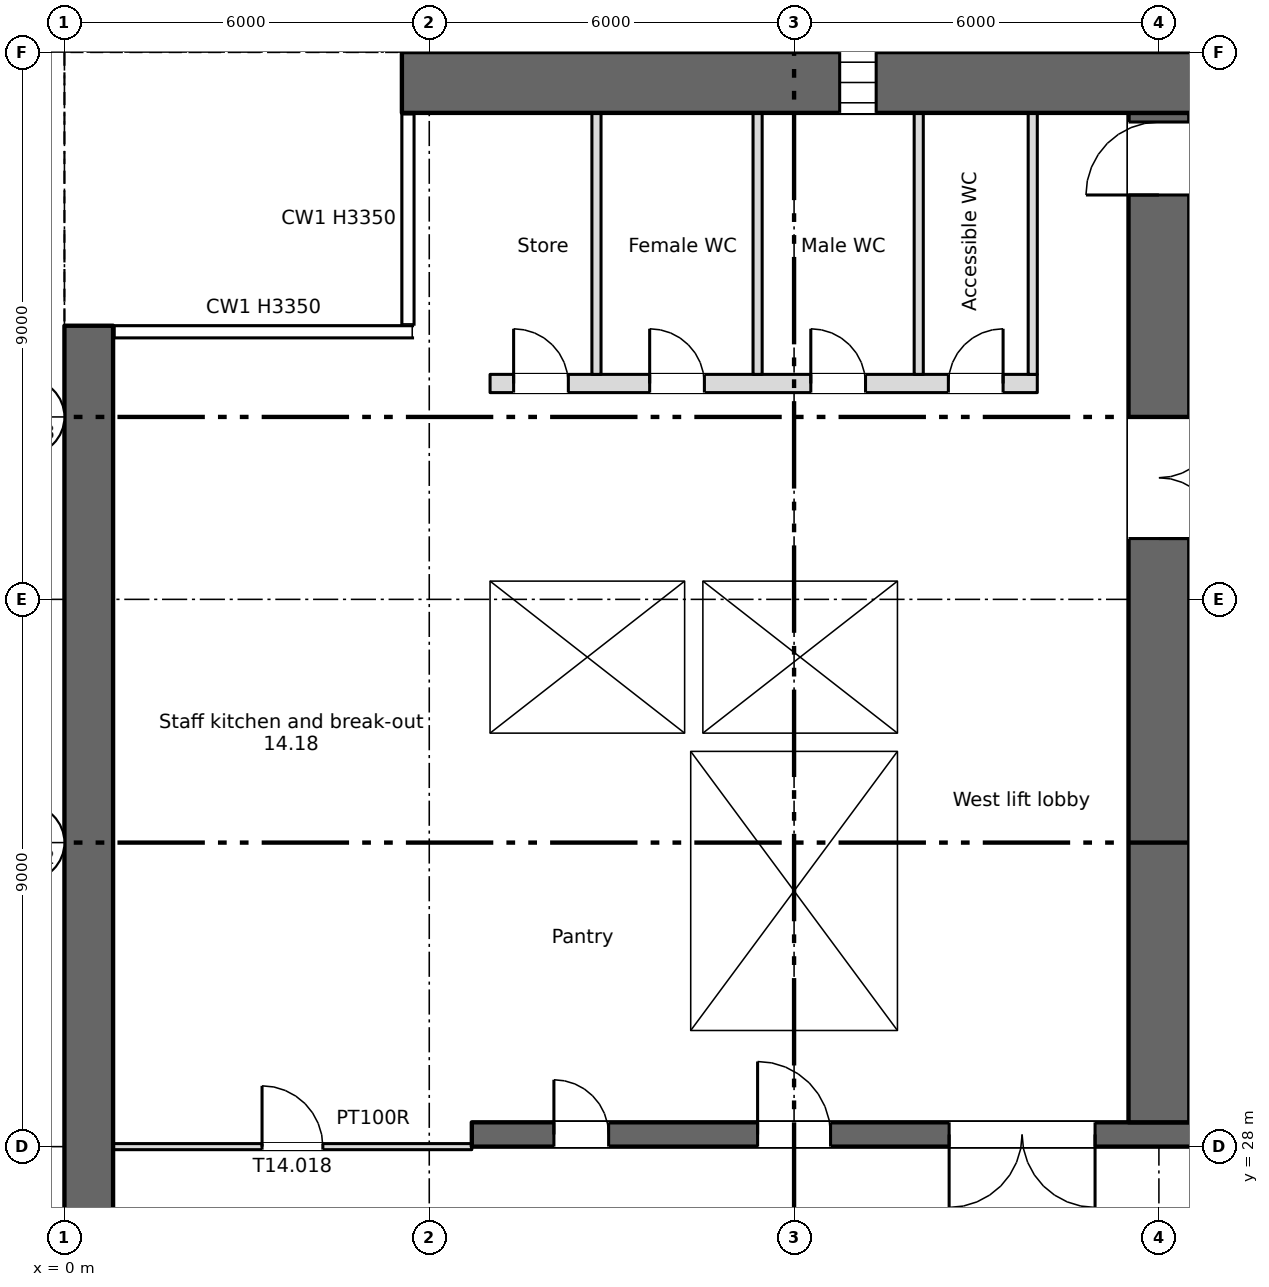
"""IFC4 building model, lengths in metres.
Left out: names, types, materials, properties, quantities, classifications, styles, units other than length and angle.
Written with IfcOpenShell. Run it as: python <this file> out.ifc"""

import sys

from ifc_helpers import new_model, si_unit, direction, frame, frame_2d, origin, place, context, subcontext, project, spatial, rectangle, extrude, element, fill, save


model = new_model("IFC4")
c1 = context("Model", 3, precision=1e-05, world=origin(), true_north=direction((0.0, 1.0)))
c2 = subcontext(c1, "Body", "Model", "MODEL_VIEW")
j1 = project(units=[si_unit("LENGTHUNIT", "METRE"), si_unit("PLANEANGLEUNIT", "RADIAN")], contexts=[c1])
p1 = place(None, origin())
s1 = spatial("IfcSite", under=j1, at=p1, CompositionType="ELEMENT")
p2 = place(p1, origin())
s2 = spatial("IfcBuilding", under=s1, at=p2, CompositionType="ELEMENT")
p3 = place(p2, frame((0.0, 0.0, 78.75)))
s3 = spatial("IfcBuildingStorey", under=s2, at=p3, CompositionType="ELEMENT", Elevation=78.75)
p4 = place(p3, frame((0.4, 4.5, 0.0), z_axis=(0.0, 0.0, 1.0), x_axis=(0.0, 1.0, 0.0)))
e1 = element("IfcWall", 1, at=p4, inside=s3, PredefinedType="SHEAR", context=c2, shape_type="SweptSolid", body=[
    extrude(rectangle(XDim=37.0, YDim=0.8, at=frame_2d((18.5, 0.0))), origin(), (0.0, 0.0, 1.0), 3.35),
])
p5 = place(p4, frame((1.2, 0.0, 0.6)))
e2 = element("IfcOpeningElement", 2, at=p5, cuts=e1, PredefinedType="OPENING", context=c2, shape_type="SweptSolid", body=[
    extrude(rectangle(XDim=0.6, YDim=2.4, at=frame_2d((0.3, 1.2))), frame((0.0, 0.41, 0.0), z_axis=(0.0, -1.0, 0.0), x_axis=(1.0, 0.0, 0.0)), (0.0, 0.0, 1.0), 0.82),
])
p6 = place(p4, frame((7.2, 0.0, 0.6)))
e3 = element("IfcOpeningElement", 3, at=p6, cuts=e1, PredefinedType="OPENING", context=c2, shape_type="SweptSolid", body=[
    extrude(rectangle(XDim=0.6, YDim=2.4, at=frame_2d((0.3, 1.2))), frame((0.0, 0.41, 0.0), z_axis=(0.0, -1.0, 0.0), x_axis=(1.0, 0.0, 0.0)), (0.0, 0.0, 1.0), 0.82),
])
p7 = place(p4, frame((13.2, 0.0, 0.6)))
e4 = element("IfcOpeningElement", 4, at=p7, cuts=e1, PredefinedType="OPENING", context=c2, shape_type="SweptSolid", body=[
    extrude(rectangle(XDim=0.6, YDim=2.4, at=frame_2d((0.3, 1.2))), frame((0.0, 0.41, 0.0), z_axis=(0.0, -1.0, 0.0), x_axis=(1.0, 0.0, 0.0)), (0.0, 0.0, 1.0), 0.82),
])
p8 = place(p4, frame((19.2, 0.0, 0.6)))
e5 = element("IfcOpeningElement", 5, at=p8, cuts=e1, PredefinedType="OPENING", context=c2, shape_type="SweptSolid", body=[
    extrude(rectangle(XDim=0.6, YDim=2.4, at=frame_2d((0.3, 1.2))), frame((0.0, 0.41, 0.0), z_axis=(0.0, -1.0, 0.0), x_axis=(1.0, 0.0, 0.0)), (0.0, 0.0, 1.0), 0.82),
])
p9 = place(p3, frame((5.55, 45.5, 0.0), z_axis=(0.0, 0.0, 1.0), x_axis=(1.0, 0.0, 0.0)))
e6 = element("IfcWall", 6, at=p9, inside=s3, PredefinedType="SHEAR", context=c2, shape_type="SweptSolid", body=[
    extrude(rectangle(XDim=66.9, YDim=1.0, at=frame_2d((33.45, 0.0))), origin(), (0.0, 0.0, 1.0), 3.35),
])
p10 = place(p9, frame((7.2, 0.0, 0.6)))
e7 = element("IfcOpeningElement", 7, at=p10, cuts=e6, PredefinedType="OPENING", context=c2, shape_type="SweptSolid", body=[
    extrude(rectangle(XDim=0.6, YDim=2.4, at=frame_2d((0.3, 1.2))), frame((0.0, 0.51, 0.0), z_axis=(0.0, -1.0, 0.0), x_axis=(1.0, 0.0, 0.0)), (0.0, 0.0, 1.0), 1.02),
])
p11 = place(p9, frame((61.2, 0.0, 0.6)))
e8 = element("IfcOpeningElement", 8, at=p11, cuts=e6, PredefinedType="OPENING", context=c2, shape_type="SweptSolid", body=[
    extrude(rectangle(XDim=0.6, YDim=2.4, at=frame_2d((0.3, 1.2))), frame((0.0, 0.51, 0.0), z_axis=(0.0, -1.0, 0.0), x_axis=(1.0, 0.0, 0.0)), (0.0, 0.0, 1.0), 1.02),
])
p12 = place(p3, frame((6.7, 28.2, 0.0), z_axis=(0.0, 0.0, 1.0), x_axis=(1.0, 0.0, 0.0)))
e9 = element("IfcWall", 9, at=p12, inside=s3, PredefinedType="SHEAR", context=c2, shape_type="SweptSolid", body=[
    extrude(rectangle(XDim=57.8, YDim=0.4, at=frame_2d((28.9, 0.0))), origin(), (0.0, 0.0, 1.0), 3.35),
])
p13 = place(p12, frame((12.062, 0.0, 0.0)))
e10 = element("IfcOpeningElement", 10, at=p13, cuts=e9, PredefinedType="OPENING", context=c2, shape_type="SweptSolid", body=[
    extrude(rectangle(XDim=0.9, YDim=2.1, at=frame_2d((0.45, 1.05))), frame((0.0, 0.21, 0.0), z_axis=(0.0, -1.0, 0.0), x_axis=(1.0, 0.0, 0.0)), (0.0, 0.0, 1.0), 0.42),
])
p14 = place(p12, frame((14.637, 0.0, 0.0)))
e11 = element("IfcOpeningElement", 11, at=p14, cuts=e9, PredefinedType="OPENING", context=c2, shape_type="SweptSolid", body=[
    extrude(rectangle(XDim=0.9, YDim=2.1, at=frame_2d((0.45, 1.05))), frame((0.0, 0.21, 0.0), z_axis=(0.0, -1.0, 0.0), x_axis=(1.0, 0.0, 0.0)), (0.0, 0.0, 1.0), 0.42),
])
p15 = place(p12, frame((49.062, 0.0, 0.0)))
e12 = element("IfcOpeningElement", 12, at=p15, cuts=e9, PredefinedType="OPENING", context=c2, shape_type="SweptSolid", body=[
    extrude(rectangle(XDim=0.9, YDim=2.1, at=frame_2d((0.45, 1.05))), frame((0.0, 0.21, 0.0), z_axis=(0.0, -1.0, 0.0), x_axis=(1.0, 0.0, 0.0)), (0.0, 0.0, 1.0), 0.42),
])
p16 = place(p12, frame((51.637, 0.0, 0.0)))
e13 = element("IfcOpeningElement", 13, at=p16, cuts=e9, PredefinedType="OPENING", context=c2, shape_type="SweptSolid", body=[
    extrude(rectangle(XDim=0.9, YDim=2.1, at=frame_2d((0.45, 1.05))), frame((0.0, 0.21, 0.0), z_axis=(0.0, -1.0, 0.0), x_axis=(1.0, 0.0, 0.0)), (0.0, 0.0, 1.0), 0.42),
])
p17 = place(p12, frame((1.35, 0.0, 0.0)))
e14 = element("IfcOpeningElement", 14, at=p17, cuts=e9, PredefinedType="OPENING", context=c2, shape_type="SweptSolid", body=[
    extrude(rectangle(XDim=0.9, YDim=2.1, at=frame_2d((0.45, 1.05))), frame((0.0, 0.21, 0.0), z_axis=(0.0, -1.0, 0.0), x_axis=(1.0, 0.0, 0.0)), (0.0, 0.0, 1.0), 0.42),
])
p18 = place(p12, frame((4.7, 0.0, 0.0)))
e15 = element("IfcOpeningElement", 15, at=p18, cuts=e9, PredefinedType="OPENING", context=c2, shape_type="SweptSolid", body=[
    extrude(rectangle(XDim=1.2, YDim=2.1, at=frame_2d((0.6, 1.05))), frame((0.0, 0.21, 0.0), z_axis=(0.0, -1.0, 0.0), x_axis=(1.0, 0.0, 0.0)), (0.0, 0.0, 1.0), 0.42),
])
p19 = place(p12, frame((31.7, 0.0, 0.0)))
e16 = element("IfcOpeningElement", 16, at=p19, cuts=e9, PredefinedType="OPENING", context=c2, shape_type="SweptSolid", body=[
    extrude(rectangle(XDim=1.2, YDim=2.1, at=frame_2d((0.6, 1.05))), frame((0.0, 0.21, 0.0), z_axis=(0.0, -1.0, 0.0), x_axis=(1.0, 0.0, 0.0)), (0.0, 0.0, 1.0), 0.42),
])
p20 = place(p12, frame((55.2, 0.0, 0.0)))
e17 = element("IfcOpeningElement", 17, at=p20, cuts=e9, PredefinedType="OPENING", context=c2, shape_type="SweptSolid", body=[
    extrude(rectangle(XDim=1.2, YDim=2.1, at=frame_2d((0.6, 1.05))), frame((0.0, 0.21, 0.0), z_axis=(0.0, -1.0, 0.0), x_axis=(1.0, 0.0, 0.0)), (0.0, 0.0, 1.0), 0.42),
])
p21 = place(p12, frame((21.7, 0.0, 0.0)))
e18 = element("IfcOpeningElement", 18, at=p21, cuts=e9, PredefinedType="OPENING", context=c2, shape_type="SweptSolid", body=[
    extrude(rectangle(XDim=1.2, YDim=2.1, at=frame_2d((0.6, 1.05))), frame((0.0, 0.21, 0.0), z_axis=(0.0, -1.0, 0.0), x_axis=(1.0, 0.0, 0.0)), (0.0, 0.0, 1.0), 0.42),
])
p22 = place(p12, frame((41.7, 0.0, 0.0)))
e19 = element("IfcOpeningElement", 19, at=p22, cuts=e9, PredefinedType="OPENING", context=c2, shape_type="SweptSolid", body=[
    extrude(rectangle(XDim=1.2, YDim=2.1, at=frame_2d((0.6, 1.05))), frame((0.0, 0.21, 0.0), z_axis=(0.0, -1.0, 0.0), x_axis=(1.0, 0.0, 0.0)), (0.0, 0.0, 1.0), 0.42),
])
p23 = place(p12, frame((24.85, 0.0, 0.0)))
e20 = element("IfcOpeningElement", 20, at=p23, cuts=e9, PredefinedType="OPENING", context=c2, shape_type="SweptSolid", body=[
    extrude(rectangle(XDim=2.4, YDim=2.1, at=frame_2d((1.2, 1.05))), frame((0.0, 0.21, 0.0), z_axis=(0.0, -1.0, 0.0), x_axis=(1.0, 0.0, 0.0)), (0.0, 0.0, 1.0), 0.42),
])
p24 = place(p12, frame((37.35, 0.0, 0.0)))
e21 = element("IfcOpeningElement", 21, at=p24, cuts=e9, PredefinedType="OPENING", context=c2, shape_type="SweptSolid", body=[
    extrude(rectangle(XDim=2.4, YDim=2.1, at=frame_2d((1.2, 1.05))), frame((0.0, 0.21, 0.0), z_axis=(0.0, -1.0, 0.0), x_axis=(1.0, 0.0, 0.0)), (0.0, 0.0, 1.0), 0.42),
])
p25 = place(p12, frame((7.85, 0.0, 0.0)))
e22 = element("IfcOpeningElement", 22, at=p25, cuts=e9, PredefinedType="OPENING", context=c2, shape_type="SweptSolid", body=[
    extrude(rectangle(XDim=2.4, YDim=2.1, at=frame_2d((1.2, 1.05))), frame((0.0, 0.21, 0.0), z_axis=(0.0, -1.0, 0.0), x_axis=(1.0, 0.0, 0.0)), (0.0, 0.0, 1.0), 0.42),
])
p26 = place(p12, frame((28.85, 0.0, 0.0)))
e23 = element("IfcOpeningElement", 23, at=p26, cuts=e9, PredefinedType="OPENING", context=c2, shape_type="SweptSolid", body=[
    extrude(rectangle(XDim=0.9, YDim=2.1, at=frame_2d((0.45, 1.05))), frame((0.0, 0.21, 0.0), z_axis=(0.0, -1.0, 0.0), x_axis=(1.0, 0.0, 0.0)), (0.0, 0.0, 1.0), 0.42),
])
p27 = place(p12, frame((34.85, 0.0, 0.0)))
e24 = element("IfcOpeningElement", 24, at=p27, cuts=e9, PredefinedType="OPENING", context=c2, shape_type="SweptSolid", body=[
    extrude(rectangle(XDim=0.9, YDim=2.1, at=frame_2d((0.45, 1.05))), frame((0.0, 0.21, 0.0), z_axis=(0.0, -1.0, 0.0), x_axis=(1.0, 0.0, 0.0)), (0.0, 0.0, 1.0), 0.42),
])
p28 = place(p3, frame((6.85, 28.4, 0.0), z_axis=(0.0, 0.0, 1.0), x_axis=(0.0, 1.0, 0.0)))
e25 = element("IfcWall", 25, at=p28, inside=s3, PredefinedType="SHEAR", context=c2, shape_type="SweptSolid", body=[
    extrude(rectangle(XDim=16.6, YDim=0.3, at=frame_2d((8.3, 0.0))), origin(), (0.0, 0.0, 1.0), 3.35),
])
p29 = place(p3, frame((18.0, 28.4, 0.0), z_axis=(0.0, 0.0, 1.0), x_axis=(0.0, 1.0, 0.0)))
e26 = element("IfcWall", 26, at=p29, inside=s3, PredefinedType="SHEAR", context=c2, shape_type="SweptSolid", body=[
    extrude(rectangle(XDim=16.6, YDim=1.0, at=frame_2d((8.3, 0.0))), origin(), (0.0, 0.0, 1.0), 3.35),
])
p30 = place(p29, frame((9.6, 0.0, 0.0)))
e27 = element("IfcOpeningElement", 27, at=p30, cuts=e26, PredefinedType="OPENING", context=c2, shape_type="SweptSolid", body=[
    extrude(rectangle(XDim=2.0, YDim=2.1, at=frame_2d((1.0, 1.05))), frame((0.0, 0.51, 0.0), z_axis=(0.0, -1.0, 0.0), x_axis=(1.0, 0.0, 0.0)), (0.0, 0.0, 1.0), 1.02),
])
p31 = place(p29, frame((15.25, 0.0, 0.0)))
e28 = element("IfcOpeningElement", 28, at=p31, cuts=e26, PredefinedType="OPENING", context=c2, shape_type="SweptSolid", body=[
    extrude(rectangle(XDim=1.2, YDim=2.1, at=frame_2d((0.6, 1.05))), frame((0.0, 0.51, 0.0), z_axis=(0.0, -1.0, 0.0), x_axis=(1.0, 0.0, 0.0)), (0.0, 0.0, 1.0), 1.02),
])
for number, where, z_axis, x_axis in (
    (29, (10.15, 28.4, 0.0), (0.0, 0.0, 1.0), (0.0, 1.0, 0.0)),
    (30, (13.85, 28.4, 0.0), (0.0, 0.0, 1.0), (0.0, 1.0, 0.0)),
):
    element("IfcWall", number, at=place(p3, frame(where, z_axis=z_axis, x_axis=x_axis)), inside=s3, PredefinedType="SHEAR", context=c2, shape_type="SweptSolid", body=[
        extrude(rectangle(XDim=6.1, YDim=0.3, at=frame_2d((3.05, 0.0))), origin(), (0.0, 0.0, 1.0), 3.35),
    ])
for number, where, z_axis, x_axis in (
    (31, (7.0, 34.65, 0.0), (0.0, 0.0, 1.0), (1.0, 0.0, 0.0)),
    (32, (7.0, 37.45, 0.0), (0.0, 0.0, 1.0), (1.0, 0.0, 0.0)),
):
    element("IfcWall", number, at=place(p3, frame(where, z_axis=z_axis, x_axis=x_axis)), inside=s3, PredefinedType="SHEAR", context=c2, shape_type="SweptSolid", body=[
        extrude(rectangle(XDim=7.0, YDim=0.3, at=frame_2d((3.5, 0.0))), origin(), (0.0, 0.0, 1.0), 3.35),
    ])
p32 = place(p3, frame((13.85, 34.8, 0.0), z_axis=(0.0, 0.0, 1.0), x_axis=(0.0, 1.0, 0.0)))
e33 = element("IfcWall", 33, at=p32, inside=s3, PredefinedType="SHEAR", context=c2, shape_type="SweptSolid", body=[
    extrude(rectangle(XDim=2.5, YDim=0.3, at=frame_2d((1.25, 0.0))), origin(), (0.0, 0.0, 1.0), 3.35),
])
p33 = place(p3, frame((7.0, 40.55, 0.0), z_axis=(0.0, 0.0, 1.0), x_axis=(1.0, 0.0, 0.0)))
e34 = element("IfcWall", 34, at=p33, inside=s3, PredefinedType="PARTITIONING", context=c2, shape_type="SweptSolid", body=[
    extrude(rectangle(XDim=9.0, YDim=0.3, at=frame_2d((4.5, 0.0))), origin(), (0.0, 0.0, 1.0), 3.35),
])
p34 = place(p33, frame((0.387, 0.0, 0.0)))
e35 = element("IfcOpeningElement", 35, at=p34, cuts=e34, PredefinedType="OPENING", context=c2, shape_type="SweptSolid", body=[
    extrude(rectangle(XDim=0.9, YDim=2.1, at=frame_2d((0.45, 1.05))), frame((0.0, 0.16, 0.0), z_axis=(0.0, -1.0, 0.0), x_axis=(1.0, 0.0, 0.0)), (0.0, 0.0, 1.0), 0.32),
])
p35 = place(p33, frame((2.625, 0.0, 0.0)))
e36 = element("IfcOpeningElement", 36, at=p35, cuts=e34, PredefinedType="OPENING", context=c2, shape_type="SweptSolid", body=[
    extrude(rectangle(XDim=0.9, YDim=2.1, at=frame_2d((0.45, 1.05))), frame((0.0, 0.16, 0.0), z_axis=(0.0, -1.0, 0.0), x_axis=(1.0, 0.0, 0.0)), (0.0, 0.0, 1.0), 0.32),
])
p36 = place(p33, frame((5.275, 0.0, 0.0)))
e37 = element("IfcOpeningElement", 37, at=p36, cuts=e34, PredefinedType="OPENING", context=c2, shape_type="SweptSolid", body=[
    extrude(rectangle(XDim=0.9, YDim=2.1, at=frame_2d((0.45, 1.05))), frame((0.0, 0.16, 0.0), z_axis=(0.0, -1.0, 0.0), x_axis=(1.0, 0.0, 0.0)), (0.0, 0.0, 1.0), 0.32),
])
p37 = place(p33, frame((7.538, 0.0, 0.0)))
e38 = element("IfcOpeningElement", 38, at=p37, cuts=e34, PredefinedType="OPENING", context=c2, shape_type="SweptSolid", body=[
    extrude(rectangle(XDim=0.9, YDim=2.1, at=frame_2d((0.45, 1.05))), frame((0.0, 0.16, 0.0), z_axis=(0.0, -1.0, 0.0), x_axis=(1.0, 0.0, 0.0)), (0.0, 0.0, 1.0), 0.32),
])
p38 = place(p3, frame((10.35, 34.8, 0.0), z_axis=(0.0, 0.0, 1.0), x_axis=(0.0, 1.0, 0.0)))
e39 = element("IfcWall", 39, at=p38, inside=s3, PredefinedType="SHEAR", context=c2, shape_type="SweptSolid", body=[
    extrude(rectangle(XDim=2.5, YDim=0.3, at=frame_2d((1.25, 0.0))), origin(), (0.0, 0.0, 1.0), 3.35),
])
for number, where, z_axis, x_axis in (
    (40, (15.925, 40.7, 0.0), (0.0, 0.0, 1.0), (0.0, 1.0, 0.0)),
    (41, (8.75, 40.7, 0.0), (0.0, 0.0, 1.0), (0.0, 1.0, 0.0)),
    (42, (11.4, 40.7, 0.0), (0.0, 0.0, 1.0), (0.0, 1.0, 0.0)),
    (43, (14.05, 40.7, 0.0), (0.0, 0.0, 1.0), (0.0, 1.0, 0.0)),
):
    element("IfcWall", number, at=place(p3, frame(where, z_axis=z_axis, x_axis=x_axis)), inside=s3, PredefinedType="PARTITIONING", context=c2, shape_type="SweptSolid", body=[
        extrude(rectangle(XDim=4.3, YDim=0.15, at=frame_2d((2.15, 0.0))), origin(), (0.0, 0.0, 1.0), 3.35),
    ])
p39 = place(p3, frame((0.8, 28.0, 0.0), z_axis=(0.0, 0.0, 1.0), x_axis=(1.0, 0.0, 0.0)))
e44 = element("IfcWall", 44, at=p39, inside=s3, PredefinedType="PARTITIONING", context=c2, shape_type="SweptSolid", body=[
    extrude(rectangle(XDim=5.9, YDim=0.1, at=frame_2d((2.95, 0.0))), origin(), (0.0, 0.0, 1.0), 3.35),
])
p40 = place(p39, frame((2.45, 0.0, 0.0)))
e45 = element("IfcOpeningElement", 45, at=p40, cuts=e44, PredefinedType="OPENING", context=c2, shape_type="SweptSolid", body=[
    extrude(rectangle(XDim=1.0, YDim=2.1, at=frame_2d((0.5, 1.05))), frame((0.0, 0.06, 0.0), z_axis=(0.0, -1.0, 0.0), x_axis=(1.0, 0.0, 0.0)), (0.0, 0.0, 1.0), 0.12),
])
p41 = place(p10, origin())
e46 = element("IfcWindow", 46, at=p41, inside=s3, PartitioningType="SINGLE_PANEL", PredefinedType="WINDOW", context=c2, shape_type="SweptSolid", body=[
    extrude(rectangle(XDim=0.6, YDim=2.4, at=frame_2d((0.3, 1.2))), frame((0.0, 0.03, 0.0), z_axis=(0.0, -1.0, 0.0), x_axis=(1.0, 0.0, 0.0)), (0.0, 0.0, 1.0), 0.06),
])
fill(e7, e46)
p42 = place(p17, origin())
e47 = element("IfcDoor", 47, at=p42, inside=s3, OperationType="SINGLE_SWING_LEFT", PredefinedType="DOOR", context=c2, shape_type="SweptSolid", body=[
    extrude(rectangle(XDim=0.9, YDim=2.1, at=frame_2d((0.45, 1.05))), frame((0.0, 0.025, 0.0), z_axis=(0.0, -1.0, 0.0), x_axis=(1.0, 0.0, 0.0)), (0.0, 0.0, 1.0), 0.05),
])
fill(e14, e47)
p43 = place(p34, origin())
e48 = element("IfcDoor", 48, at=p43, inside=s3, OperationType="SINGLE_SWING_LEFT", PredefinedType="DOOR", context=c2, shape_type="SweptSolid", body=[
    extrude(rectangle(XDim=0.9, YDim=2.1, at=frame_2d((0.45, 1.05))), frame((0.0, 0.025, 0.0), z_axis=(0.0, -1.0, 0.0), x_axis=(1.0, 0.0, 0.0)), (0.0, 0.0, 1.0), 0.05),
])
fill(e35, e48)
p44 = place(p35, origin())
e49 = element("IfcDoor", 49, at=p44, inside=s3, OperationType="SINGLE_SWING_LEFT", PredefinedType="DOOR", context=c2, shape_type="SweptSolid", body=[
    extrude(rectangle(XDim=0.9, YDim=2.1, at=frame_2d((0.45, 1.05))), frame((0.0, 0.025, 0.0), z_axis=(0.0, -1.0, 0.0), x_axis=(1.0, 0.0, 0.0)), (0.0, 0.0, 1.0), 0.05),
])
fill(e36, e49)
p45 = place(p36, origin())
e50 = element("IfcDoor", 50, at=p45, inside=s3, OperationType="SINGLE_SWING_LEFT", PredefinedType="DOOR", context=c2, shape_type="SweptSolid", body=[
    extrude(rectangle(XDim=0.9, YDim=2.1, at=frame_2d((0.45, 1.05))), frame((0.0, 0.025, 0.0), z_axis=(0.0, -1.0, 0.0), x_axis=(1.0, 0.0, 0.0)), (0.0, 0.0, 1.0), 0.05),
])
fill(e37, e50)
p46 = place(p37, origin())
e51 = element("IfcDoor", 51, at=p46, inside=s3, OperationType="SINGLE_SWING_RIGHT", PredefinedType="DOOR", context=c2, shape_type="SweptSolid", body=[
    extrude(rectangle(XDim=0.9, YDim=2.1, at=frame_2d((0.45, 1.05))), frame((0.0, 0.025, 0.0), z_axis=(0.0, -1.0, 0.0), x_axis=(1.0, 0.0, 0.0)), (0.0, 0.0, 1.0), 0.05),
])
fill(e38, e51)
p47 = place(p18, origin())
e52 = element("IfcDoor", 52, at=p47, inside=s3, OperationType="SINGLE_SWING_LEFT", PredefinedType="DOOR", context=c2, shape_type="SweptSolid", body=[
    extrude(rectangle(XDim=1.2, YDim=2.1, at=frame_2d((0.6, 1.05))), frame((0.0, 0.025, 0.0), z_axis=(0.0, -1.0, 0.0), x_axis=(1.0, 0.0, 0.0)), (0.0, 0.0, 1.0), 0.05),
])
fill(e15, e52)
p48 = place(p25, origin())
e53 = element("IfcDoor", 53, at=p48, inside=s3, OperationType="DOUBLE_DOOR_SINGLE_SWING", PredefinedType="DOOR", context=c2, shape_type="SweptSolid", body=[
    extrude(rectangle(XDim=2.4, YDim=2.1, at=frame_2d((1.2, 1.05))), frame((0.0, 0.025, 0.0), z_axis=(0.0, -1.0, 0.0), x_axis=(1.0, 0.0, 0.0)), (0.0, 0.0, 1.0), 0.05),
])
fill(e22, e53)
p49 = place(p30, origin())
e54 = element("IfcDoor", 54, at=p49, inside=s3, OperationType="DOUBLE_DOOR_SINGLE_SWING", PredefinedType="DOOR", context=c2, shape_type="SweptSolid", body=[
    extrude(rectangle(XDim=2.0, YDim=2.1, at=frame_2d((1.0, 1.05))), frame((0.0, 0.025, 0.0), z_axis=(0.0, -1.0, 0.0), x_axis=(1.0, 0.0, 0.0)), (0.0, 0.0, 1.0), 0.05),
])
fill(e27, e54)
p50 = place(p31, origin())
e55 = element("IfcDoor", 55, at=p50, inside=s3, OperationType="SINGLE_SWING_LEFT", PredefinedType="DOOR", context=c2, shape_type="SweptSolid", body=[
    extrude(rectangle(XDim=1.2, YDim=2.1, at=frame_2d((0.6, 1.05))), frame((0.0, 0.025, 0.0), z_axis=(0.0, -1.0, 0.0), x_axis=(1.0, 0.0, 0.0)), (0.0, 0.0, 1.0), 0.05),
])
fill(e28, e55)
p51 = place(p40, origin())
e56 = element("IfcDoor", 56, at=p51, inside=s3, OperationType="SINGLE_SWING_LEFT", PredefinedType="DOOR", context=c2, shape_type="SweptSolid", body=[
    extrude(rectangle(XDim=1.0, YDim=2.1, at=frame_2d((0.5, 1.05))), frame((0.0, 0.025, 0.0), z_axis=(0.0, -1.0, 0.0), x_axis=(1.0, 0.0, 0.0)), (0.0, 0.0, 1.0), 0.05),
])
fill(e45, e56)
save(model, sys.argv[1])
